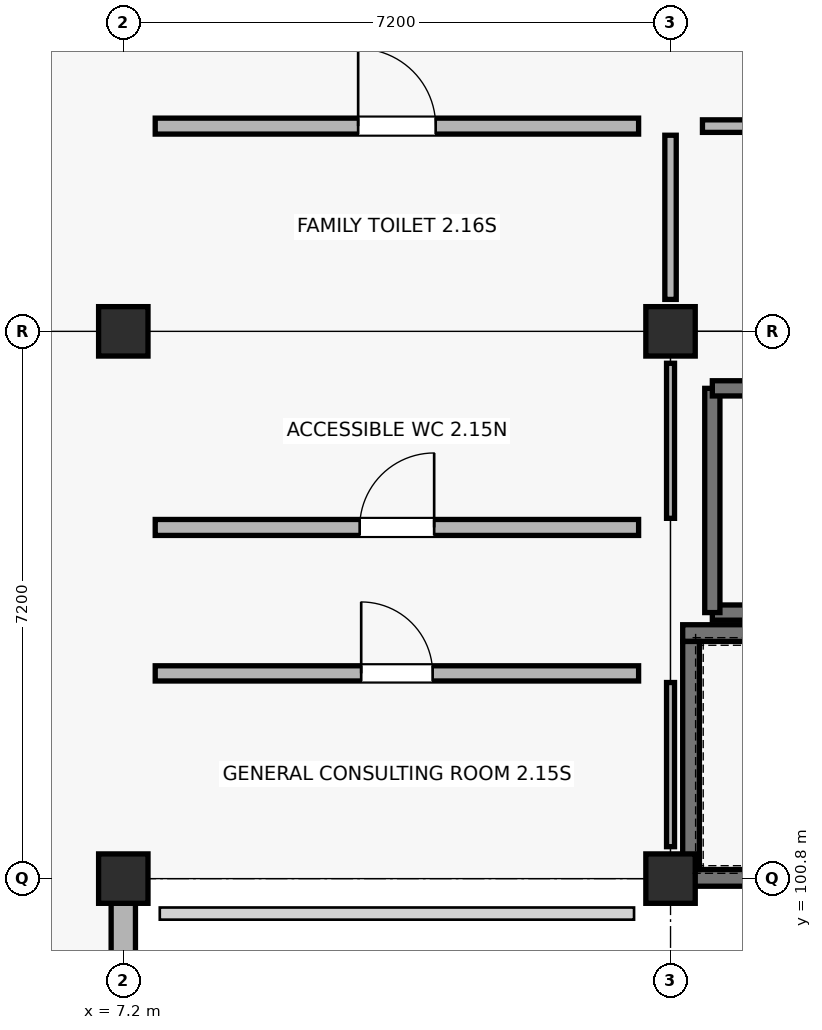
"""IFC4 building model, lengths in metres.
Left out: names, types, materials, properties, quantities, classifications, styles, units other than length and angle.
Written with IfcOpenShell. Run it as: python <this file> out.ifc"""

import sys

from ifc_helpers import new_model, si_unit, direction, frame, frame_2d, origin, origin_2d, place, context, subcontext, project, spatial, rectangle, extrude, element, fill, save


model = new_model("IFC4")
c1 = context("Model", 3, precision=1e-05, world=origin(), true_north=direction((0.0, 1.0)))
c2 = subcontext(c1, "Body", "Model", "MODEL_VIEW")
j1 = project(units=[si_unit("LENGTHUNIT", "METRE"), si_unit("PLANEANGLEUNIT", "RADIAN")], contexts=[c1])
p1 = place(None, origin())
s1 = spatial("IfcSite", under=j1, at=p1, CompositionType="ELEMENT")
p2 = place(p1, origin())
s2 = spatial("IfcBuilding", under=s1, at=p2, CompositionType="ELEMENT")
p3 = place(p2, frame((0.0, 0.0, 9.0)))
s3 = spatial("IfcBuildingStorey", under=s2, at=p3, CompositionType="ELEMENT", Elevation=9.0)
for number, where, z_axis, x_axis in (
    (1, (7.2, 100.8, 0.0), (0.0, 0.0, 1.0), (1.0, 0.0, 0.0)),
    (2, (7.2, 108.0, 0.0), (0.0, 0.0, 1.0), (1.0, 0.0, 0.0)),
    (3, (14.4, 100.8, 0.0), (0.0, 0.0, 1.0), (1.0, 0.0, 0.0)),
    (4, (14.4, 108.0, 0.0), (0.0, 0.0, 1.0), (1.0, 0.0, 0.0)),
):
    element("IfcColumn", number, at=place(p3, frame(where, z_axis=z_axis, x_axis=x_axis)), inside=s3, PredefinedType="COLUMN", context=c2, shape_type="SweptSolid", body=[
        extrude(rectangle(XDim=0.65, YDim=0.65, at=origin_2d()), origin(), (0.0, 0.0, 1.0), 4.5),
    ])
p4 = place(p3, frame((7.2, 93.925, 0.0), z_axis=(0.0, 0.0, 1.0), x_axis=(0.0, 1.0, 0.0)))
e5 = element("IfcWall", 5, at=p4, inside=s3, PredefinedType="STANDARD", context=c2, shape_type="SweptSolid", body=[
    extrude(rectangle(XDim=6.55, YDim=0.32, at=frame_2d((3.275, 0.0))), origin(), (0.0, 0.0, 1.0), 3.69),
])
p5 = place(p3, frame((14.56, 100.81, 0.0), z_axis=(0.0, 0.0, 1.0), x_axis=(1.0, 0.0, 0.0)))
e6 = element("IfcWall", 6, at=p5, inside=s3, PredefinedType="SHEAR", context=c2, shape_type="SweptSolid", body=[
    extrude(rectangle(XDim=6.88, YDim=0.22, at=frame_2d((3.44, 0.0))), origin(), (0.0, 0.0, 1.0), 4.24),
])
p6 = place(p3, frame((14.56, 104.03, 0.0), z_axis=(0.0, 0.0, 1.0), x_axis=(1.0, 0.0, 0.0)))
e7 = element("IfcWall", 7, at=p6, inside=s3, PredefinedType="SHEAR", context=c2, shape_type="SweptSolid", body=[
    extrude(rectangle(XDim=6.88, YDim=0.22, at=frame_2d((3.44, 0.0))), origin(), (0.0, 0.0, 1.0), 4.24),
])
p7 = place(p6, frame((5.25, 0.0, 0.0)))
e8 = element("IfcOpeningElement", 8, at=p7, cuts=e7, PredefinedType="OPENING", context=c2, shape_type="SweptSolid", body=[
    extrude(rectangle(XDim=1.2, YDim=2.15, at=frame_2d((0.6, 1.075))), frame((0.0, 0.12, 0.0), z_axis=(0.0, -1.0, 0.0), x_axis=(1.0, 0.0, 0.0)), (0.0, 0.0, 1.0), 0.24),
])
p8 = place(p3, frame((14.67, 100.92, 0.0), z_axis=(0.0, 0.0, 1.0), x_axis=(0.0, 1.0, 0.0)))
e9 = element("IfcWall", 9, at=p8, inside=s3, PredefinedType="SHEAR", context=c2, shape_type="SweptSolid", body=[
    extrude(rectangle(XDim=3.0, YDim=0.22, at=frame_2d((1.5, 0.0))), origin(), (0.0, 0.0, 1.0), 4.24),
])
p9 = place(p3, frame((14.95, 104.3, 0.0), z_axis=(0.0, 0.0, 1.0), x_axis=(1.0, 0.0, 0.0)))
e10 = element("IfcWall", 10, at=p9, inside=s3, PredefinedType="SHEAR", context=c2, shape_type="SweptSolid", body=[
    extrude(rectangle(XDim=2.3, YDim=0.2, at=frame_2d((1.15, 0.0))), origin(), (0.0, 0.0, 1.0), 4.24),
])
p10 = place(p3, frame((14.95, 104.3, 0.0), z_axis=(0.0, 0.0, 1.0), x_axis=(0.0, 1.0, 0.0)))
e11 = element("IfcWall", 11, at=p10, inside=s3, PredefinedType="SHEAR", context=c2, shape_type="SweptSolid", body=[
    extrude(rectangle(XDim=2.95, YDim=0.2, at=frame_2d((1.475, 0.0))), origin(), (0.0, 0.0, 1.0), 4.24),
])
p11 = place(p3, frame((14.95, 107.25, 0.0), z_axis=(0.0, 0.0, 1.0), x_axis=(1.0, 0.0, 0.0)))
e12 = element("IfcWall", 12, at=p11, inside=s3, PredefinedType="SHEAR", context=c2, shape_type="SweptSolid", body=[
    extrude(rectangle(XDim=2.3, YDim=0.2, at=frame_2d((1.15, 0.0))), origin(), (0.0, 0.0, 1.0), 4.24),
])
p12 = place(p3, frame((7.62, 103.5, 0.0), z_axis=(0.0, 0.0, 1.0), x_axis=(1.0, 0.0, 0.0)))
e13 = element("IfcWall", 13, at=p12, inside=s3, PredefinedType="SOLIDWALL", context=c2, shape_type="SweptSolid", body=[
    extrude(rectangle(XDim=6.36, YDim=0.2, at=frame_2d((3.18, 0.0))), origin(), (0.0, 0.0, 1.0), 3.38),
])
p13 = place(p12, frame((2.71, 0.0, 0.0)))
e14 = element("IfcOpeningElement", 14, at=p13, cuts=e13, PredefinedType="OPENING", context=c2, shape_type="SweptSolid", body=[
    extrude(rectangle(XDim=0.94, YDim=2.09, at=frame_2d((0.47, 1.045))), frame((0.0, 0.11, 0.0), z_axis=(0.0, -1.0, 0.0), x_axis=(1.0, 0.0, 0.0)), (0.0, 0.0, 1.0), 0.22),
])
p14 = place(p3, frame((14.4, 101.22, 0.0), z_axis=(0.0, 0.0, 1.0), x_axis=(0.0, 1.0, 0.0)))
e15 = element("IfcWall", 15, at=p14, inside=s3, PredefinedType="PARTITIONING", context=c2, shape_type="SweptSolid", body=[
    extrude(rectangle(XDim=2.16, YDim=0.105, at=frame_2d((1.08, 0.0))), origin(), (0.0, 0.0, 1.0), 3.38),
])
p15 = place(p3, frame((7.62, 105.42, 0.0), z_axis=(0.0, 0.0, 1.0), x_axis=(1.0, 0.0, 0.0)))
e16 = element("IfcWall", 16, at=p15, inside=s3, PredefinedType="PLUMBINGWALL", context=c2, shape_type="SweptSolid", body=[
    extrude(rectangle(XDim=6.36, YDim=0.21, at=frame_2d((3.18, 0.0))), origin(), (0.0, 0.0, 1.0), 3.38),
])
p16 = place(p15, frame((2.69, 0.0, 0.0)))
e17 = element("IfcOpeningElement", 17, at=p16, cuts=e16, PredefinedType="OPENING", context=c2, shape_type="SweptSolid", body=[
    extrude(rectangle(XDim=0.98, YDim=2.09, at=frame_2d((0.49, 1.045))), frame((0.0, 0.115, 0.0), z_axis=(0.0, -1.0, 0.0), x_axis=(1.0, 0.0, 0.0)), (0.0, 0.0, 1.0), 0.23),
])
p17 = place(p3, frame((14.4, 105.54, 0.0), z_axis=(0.0, 0.0, 1.0), x_axis=(0.0, 1.0, 0.0)))
e18 = element("IfcWall", 18, at=p17, inside=s3, PredefinedType="PARTITIONING", context=c2, shape_type="SweptSolid", body=[
    extrude(rectangle(XDim=2.04, YDim=0.105, at=frame_2d((1.02, 0.0))), origin(), (0.0, 0.0, 1.0), 3.38),
])
p18 = place(p3, frame((7.62, 110.7, 0.0), z_axis=(0.0, 0.0, 1.0), x_axis=(1.0, 0.0, 0.0)))
e19 = element("IfcWall", 19, at=p18, inside=s3, PredefinedType="PLUMBINGWALL", context=c2, shape_type="SweptSolid", body=[
    extrude(rectangle(XDim=6.36, YDim=0.21, at=frame_2d((3.18, 0.0))), origin(), (0.0, 0.0, 1.0), 3.38),
])
p19 = place(p18, frame((2.67, 0.0, 0.0)))
e20 = element("IfcOpeningElement", 20, at=p19, cuts=e19, PredefinedType="OPENING", context=c2, shape_type="SweptSolid", body=[
    extrude(rectangle(XDim=1.02, YDim=2.09, at=frame_2d((0.51, 1.045))), frame((0.0, 0.115, 0.0), z_axis=(0.0, -1.0, 0.0), x_axis=(1.0, 0.0, 0.0)), (0.0, 0.0, 1.0), 0.23),
])
p20 = place(p3, frame((14.4, 108.42, 0.0), z_axis=(0.0, 0.0, 1.0), x_axis=(0.0, 1.0, 0.0)))
e21 = element("IfcWall", 21, at=p20, inside=s3, PredefinedType="PARTITIONING", context=c2, shape_type="SweptSolid", body=[
    extrude(rectangle(XDim=2.16, YDim=0.15, at=frame_2d((1.08, 0.0))), origin(), (0.0, 0.0, 1.0), 3.38),
])
p21 = place(p3, frame((14.82, 110.7, 0.0), z_axis=(0.0, 0.0, 1.0), x_axis=(1.0, 0.0, 0.0)))
e22 = element("IfcWall", 22, at=p21, inside=s3, PredefinedType="PARTITIONING", context=c2, shape_type="SweptSolid", body=[
    extrude(rectangle(XDim=6.36, YDim=0.165, at=frame_2d((3.18, 0.0))), origin(), (0.0, 0.0, 1.0), 3.38),
])
p22 = place(p21, frame((2.59, 0.0, 0.0)))
e23 = element("IfcOpeningElement", 23, at=p22, cuts=e22, PredefinedType="OPENING", context=c2, shape_type="SweptSolid", body=[
    extrude(rectangle(XDim=1.18, YDim=2.09, at=frame_2d((0.59, 1.045))), frame((0.0, 0.093, 0.0), z_axis=(0.0, -1.0, 0.0), x_axis=(1.0, 0.0, 0.0)), (0.0, 0.0, 1.0), 0.185),
])
p23 = place(p13, origin())
e24 = element("IfcDoor", 24, at=p23, inside=s3, OperationType="SINGLE_SWING_LEFT", PredefinedType="DOOR", context=c2, shape_type="SweptSolid", body=[
    extrude(rectangle(XDim=0.94, YDim=2.09, at=frame_2d((0.47, 1.045))), frame((0.0, 0.025, 0.0), z_axis=(0.0, -1.0, 0.0), x_axis=(1.0, 0.0, 0.0)), (0.0, 0.0, 1.0), 0.05),
])
fill(e14, e24)
p24 = place(p16, origin())
e25 = element("IfcDoor", 25, at=p24, inside=s3, OperationType="SINGLE_SWING_RIGHT", PredefinedType="DOOR", context=c2, shape_type="SweptSolid", body=[
    extrude(rectangle(XDim=0.98, YDim=2.09, at=frame_2d((0.49, 1.045))), frame((0.0, 0.025, 0.0), z_axis=(0.0, -1.0, 0.0), x_axis=(1.0, 0.0, 0.0)), (0.0, 0.0, 1.0), 0.05),
])
fill(e17, e25)
p25 = place(p19, origin())
e26 = element("IfcDoor", 26, at=p25, inside=s3, OperationType="SINGLE_SWING_LEFT", PredefinedType="DOOR", context=c2, shape_type="SweptSolid", body=[
    extrude(rectangle(XDim=1.02, YDim=2.09, at=frame_2d((0.51, 1.045))), frame((0.0, 0.025, 0.0), z_axis=(0.0, -1.0, 0.0), x_axis=(1.0, 0.0, 0.0)), (0.0, 0.0, 1.0), 0.05),
])
fill(e20, e26)
save(model, sys.argv[1])
